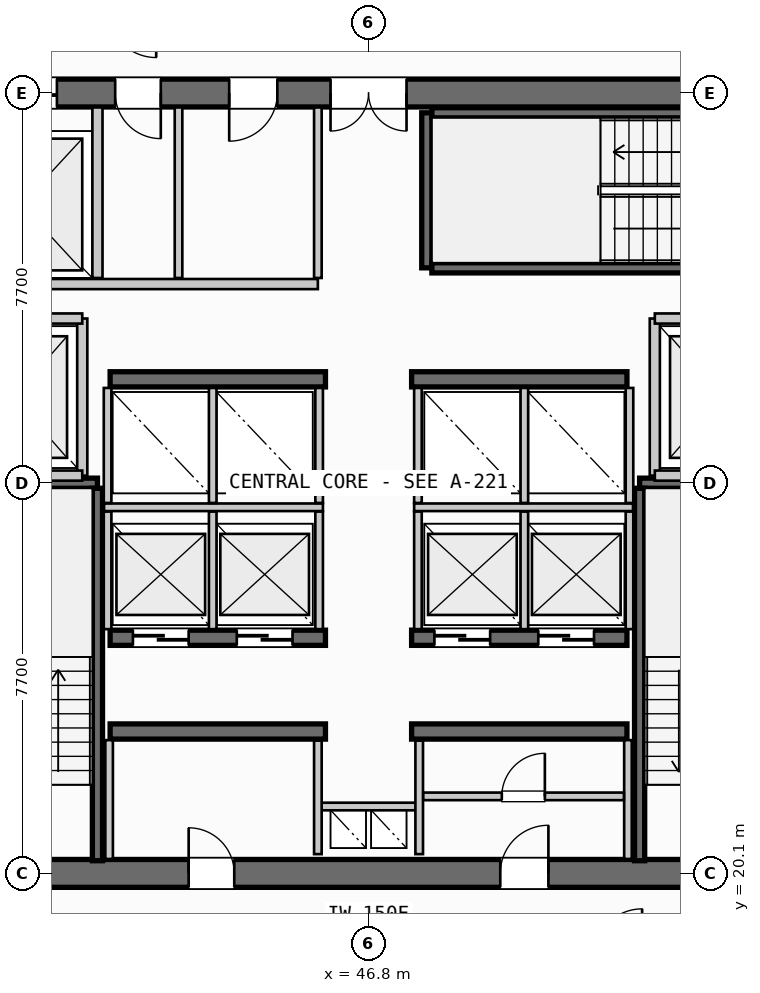
"""IFC4 building model, lengths in metres.
Left out: names, types, materials, properties, quantities, classifications, styles, units other than length and angle.
Written with IfcOpenShell. Run it as: python <this file> out.ifc"""

import sys

from ifc_helpers import new_model, si_unit, direction, frame, frame_2d, origin, place, context, subcontext, project, spatial, rectangle, extrude, source, transform, mapped, element, fill, save


model = new_model("IFC4")
c1 = context("Model", 3, precision=1e-05, world=origin(), true_north=direction((0.0, 1.0)))
c2 = subcontext(c1, "Body", "Model", "MODEL_VIEW")
j1 = project(units=[si_unit("LENGTHUNIT", "METRE"), si_unit("PLANEANGLEUNIT", "RADIAN")], contexts=[c1])
p1 = place(None, origin())
s1 = spatial("IfcSite", under=j1, at=p1, CompositionType="ELEMENT")
p2 = place(p1, origin())
s2 = spatial("IfcBuilding", under=s1, at=p2, CompositionType="ELEMENT")
p3 = place(p2, frame((0.0, 0.0, 150.1)))
s3 = spatial("IfcBuildingStorey", under=s2, at=p3, CompositionType="ELEMENT", Elevation=150.1)
p4 = place(p3, frame((38.0, 20.1, 0.0), z_axis=(0.0, 0.0, 1.0), x_axis=(1.0, 0.0, 0.0)))
e1 = element("IfcWall", 1, at=p4, inside=s3, PredefinedType="SHEAR", context=c2, shape_type="SweptSolid", body=[
    extrude(rectangle(XDim=17.6, YDim=0.55, at=frame_2d((8.8, 0.0))), origin(), (0.0, 0.0, 1.0), 3.3),
])
p5 = place(p4, frame((1.4, 0.0, 0.0)))
e2 = element("IfcOpeningElement", 2, at=p5, cuts=e1, PredefinedType="OPENING", context=c2, shape_type="SweptSolid", body=[
    extrude(rectangle(XDim=1.05, YDim=2.15, at=frame_2d((0.525, 1.075))), frame((0.0, 0.285, 0.0), z_axis=(0.0, -1.0, 0.0), x_axis=(1.0, 0.0, 0.0)), (0.0, 0.0, 1.0), 0.57),
])
p6 = place(p4, frame((15.15, 0.0, 0.0)))
e3 = element("IfcOpeningElement", 3, at=p6, cuts=e1, PredefinedType="OPENING", context=c2, shape_type="SweptSolid", body=[
    extrude(rectangle(XDim=1.05, YDim=2.15, at=frame_2d((0.525, 1.075))), frame((0.0, 0.285, 0.0), z_axis=(0.0, -1.0, 0.0), x_axis=(1.0, 0.0, 0.0)), (0.0, 0.0, 1.0), 0.57),
])
p7 = place(p4, frame((5.25, 0.0, 0.0)))
e4 = element("IfcOpeningElement", 4, at=p7, cuts=e1, PredefinedType="OPENING", context=c2, shape_type="SweptSolid", body=[
    extrude(rectangle(XDim=0.9, YDim=2.15, at=frame_2d((0.45, 1.075))), frame((0.0, 0.285, 0.0), z_axis=(0.0, -1.0, 0.0), x_axis=(1.0, 0.0, 0.0)), (0.0, 0.0, 1.0), 0.57),
])
p8 = place(p4, frame((11.4, 0.0, 0.0)))
e5 = element("IfcOpeningElement", 5, at=p8, cuts=e1, PredefinedType="OPENING", context=c2, shape_type="SweptSolid", body=[
    extrude(rectangle(XDim=0.95, YDim=2.15, at=frame_2d((0.475, 1.075))), frame((0.0, 0.285, 0.0), z_axis=(0.0, -1.0, 0.0), x_axis=(1.0, 0.0, 0.0)), (0.0, 0.0, 1.0), 0.57),
])
p9 = place(p3, frame((55.6, 35.5, 0.0), z_axis=(0.0, 0.0, 1.0), x_axis=(-1.0, 0.0, 0.0)))
e6 = element("IfcWall", 6, at=p9, inside=s3, PredefinedType="SHEAR", context=c2, shape_type="SweptSolid", body=[
    extrude(rectangle(XDim=17.6, YDim=0.55, at=frame_2d((8.8, 0.0))), origin(), (0.0, 0.0, 1.0), 3.3),
])
p10 = place(p9, frame((8.05, 0.0, 0.0)))
e7 = element("IfcOpeningElement", 7, at=p10, cuts=e6, PredefinedType="OPENING", context=c2, shape_type="SweptSolid", body=[
    extrude(rectangle(XDim=1.5, YDim=2.2, at=frame_2d((0.75, 1.1))), frame((0.0, 0.285, 0.0), z_axis=(0.0, -1.0, 0.0), x_axis=(1.0, 0.0, 0.0)), (0.0, 0.0, 1.0), 0.57),
])
p11 = place(p9, frame((14.95, 0.0, 0.0)))
e8 = element("IfcOpeningElement", 8, at=p11, cuts=e6, PredefinedType="OPENING", context=c2, shape_type="SweptSolid", body=[
    extrude(rectangle(XDim=1.4, YDim=2.3, at=frame_2d((0.7, 1.15))), frame((0.0, 0.285, 0.0), z_axis=(0.0, -1.0, 0.0), x_axis=(1.0, 0.0, 0.0)), (0.0, 0.0, 1.0), 0.57),
])
p12 = place(p9, frame((12.9, 0.0, 0.0)))
e9 = element("IfcOpeningElement", 9, at=p12, cuts=e6, PredefinedType="OPENING", context=c2, shape_type="SweptSolid", body=[
    extrude(rectangle(XDim=0.9, YDim=2.15, at=frame_2d((0.45, 1.075))), frame((0.0, 0.285, 0.0), z_axis=(0.0, -1.0, 0.0), x_axis=(1.0, 0.0, 0.0)), (0.0, 0.0, 1.0), 0.57),
])
p13 = place(p9, frame((10.6, 0.0, 0.0)))
e10 = element("IfcOpeningElement", 10, at=p13, cuts=e6, PredefinedType="OPENING", context=c2, shape_type="SweptSolid", body=[
    extrude(rectangle(XDim=0.95, YDim=2.15, at=frame_2d((0.475, 1.075))), frame((0.0, 0.285, 0.0), z_axis=(0.0, -1.0, 0.0), x_axis=(1.0, 0.0, 0.0)), (0.0, 0.0, 1.0), 0.57),
])
for number, where, z_axis, x_axis in (
    (11, (41.7, 22.9, 0.0), (0.0, 0.0, 1.0), (1.0, 0.0, 0.0)),
    (12, (47.65, 22.9, 0.0), (0.0, 0.0, 1.0), (1.0, 0.0, 0.0)),
):
    element("IfcWall", number, at=place(p3, frame(where, z_axis=z_axis, x_axis=x_axis)), inside=s3, PredefinedType="SHEAR", context=c2, shape_type="SweptSolid", body=[
        extrude(rectangle(XDim=4.25, YDim=0.3, at=frame_2d((2.125, 0.0))), origin(), (0.0, 0.0, 1.0), 3.3),
    ])
p14 = place(p3, frame((41.7, 24.75, 0.0), z_axis=(0.0, 0.0, 1.0), x_axis=(1.0, 0.0, 0.0)))
e13 = element("IfcWall", 13, at=p14, inside=s3, PredefinedType="SHEAR", context=c2, shape_type="SweptSolid", body=[
    extrude(rectangle(XDim=4.25, YDim=0.3, at=frame_2d((2.125, 0.0))), origin(), (0.0, 0.0, 1.0), 3.3),
])
p15 = place(p14, frame((0.45, 0.0, 0.0)))
e14 = element("IfcOpeningElement", 14, at=p15, cuts=e13, PredefinedType="OPENING", context=c2, shape_type="SweptSolid", body=[
    extrude(rectangle(XDim=1.1, YDim=2.2, at=frame_2d((0.55, 1.1))), frame((0.0, 0.16, 0.0), z_axis=(0.0, -1.0, 0.0), x_axis=(1.0, 0.0, 0.0)), (0.0, 0.0, 1.0), 0.32),
])
p16 = place(p14, frame((2.5, 0.0, 0.0)))
e15 = element("IfcOpeningElement", 15, at=p16, cuts=e13, PredefinedType="OPENING", context=c2, shape_type="SweptSolid", body=[
    extrude(rectangle(XDim=1.1, YDim=2.2, at=frame_2d((0.55, 1.1))), frame((0.0, 0.16, 0.0), z_axis=(0.0, -1.0, 0.0), x_axis=(1.0, 0.0, 0.0)), (0.0, 0.0, 1.0), 0.32),
])
p17 = place(p3, frame((47.65, 24.75, 0.0), z_axis=(0.0, 0.0, 1.0), x_axis=(1.0, 0.0, 0.0)))
e16 = element("IfcWall", 16, at=p17, inside=s3, PredefinedType="SHEAR", context=c2, shape_type="SweptSolid", body=[
    extrude(rectangle(XDim=4.25, YDim=0.3, at=frame_2d((2.125, 0.0))), origin(), (0.0, 0.0, 1.0), 3.3),
])
p18 = place(p17, frame((0.45, 0.0, 0.0)))
e17 = element("IfcOpeningElement", 17, at=p18, cuts=e16, PredefinedType="OPENING", context=c2, shape_type="SweptSolid", body=[
    extrude(rectangle(XDim=1.1, YDim=2.2, at=frame_2d((0.55, 1.1))), frame((0.0, 0.16, 0.0), z_axis=(0.0, -1.0, 0.0), x_axis=(1.0, 0.0, 0.0)), (0.0, 0.0, 1.0), 0.32),
])
p19 = place(p17, frame((2.5, 0.0, 0.0)))
e18 = element("IfcOpeningElement", 18, at=p19, cuts=e16, PredefinedType="OPENING", context=c2, shape_type="SweptSolid", body=[
    extrude(rectangle(XDim=1.1, YDim=2.2, at=frame_2d((0.55, 1.1))), frame((0.0, 0.16, 0.0), z_axis=(0.0, -1.0, 0.0), x_axis=(1.0, 0.0, 0.0)), (0.0, 0.0, 1.0), 0.32),
])
for number, where, z_axis, x_axis in (
    (19, (41.7, 29.85, 0.0), (0.0, 0.0, 1.0), (1.0, 0.0, 0.0)),
    (20, (47.65, 29.85, 0.0), (0.0, 0.0, 1.0), (1.0, 0.0, 0.0)),
):
    element("IfcWall", number, at=place(p3, frame(where, z_axis=z_axis, x_axis=x_axis)), inside=s3, PredefinedType="SHEAR", context=c2, shape_type="SweptSolid", body=[
        extrude(rectangle(XDim=4.25, YDim=0.3, at=frame_2d((2.125, 0.0))), origin(), (0.0, 0.0, 1.0), 3.3),
    ])
p20 = place(p3, frame((38.39, 27.8, 0.0), z_axis=(0.0, 0.0, 1.0), x_axis=(1.0, 0.0, 0.0)))
e21 = element("IfcWall", 21, at=p20, inside=s3, PredefinedType="SHEAR", context=c2, shape_type="SweptSolid", body=[
    extrude(rectangle(XDim=3.06, YDim=0.2, at=frame_2d((1.53, 0.0))), origin(), (0.0, 0.0, 1.0), 3.3),
])
p21 = place(p3, frame((41.45, 27.7, 0.0), z_axis=(0.0, 0.0, 1.0), x_axis=(0.0, -1.0, 0.0)))
e22 = element("IfcWall", 22, at=p21, inside=s3, PredefinedType="SHEAR", context=c2, shape_type="SweptSolid", body=[
    extrude(rectangle(XDim=7.35, YDim=0.2, at=frame_2d((3.675, 0.0))), origin(), (0.0, 0.0, 1.0), 3.3),
])
p22 = place(p3, frame((52.15, 27.8, 0.0), z_axis=(0.0, 0.0, 1.0), x_axis=(1.0, 0.0, 0.0)))
e23 = element("IfcWall", 23, at=p22, inside=s3, PredefinedType="SHEAR", context=c2, shape_type="SweptSolid", body=[
    extrude(rectangle(XDim=3.06, YDim=0.2, at=frame_2d((1.53, 0.0))), origin(), (0.0, 0.0, 1.0), 3.3),
])
p23 = place(p3, frame((52.15, 20.35, 0.0), z_axis=(0.0, 0.0, 1.0), x_axis=(0.0, 1.0, 0.0)))
e24 = element("IfcWall", 24, at=p23, inside=s3, PredefinedType="SHEAR", context=c2, shape_type="SweptSolid", body=[
    extrude(rectangle(XDim=7.35, YDim=0.2, at=frame_2d((3.675, 0.0))), origin(), (0.0, 0.0, 1.0), 3.3),
])
p24 = place(p3, frame((47.95, 32.05, 0.0), z_axis=(0.0, 0.0, 1.0), x_axis=(0.0, 1.0, 0.0)))
e25 = element("IfcWall", 25, at=p24, inside=s3, PredefinedType="SHEAR", context=c2, shape_type="SweptSolid", body=[
    extrude(rectangle(XDim=3.06, YDim=0.2, at=frame_2d((1.53, 0.0))), origin(), (0.0, 0.0, 1.0), 3.3),
])
for number, where, z_axis, x_axis in (
    (26, (48.05, 35.11, 0.0), (0.0, 0.0, 1.0), (1.0, 0.0, 0.0)),
    (27, (55.4, 32.05, 0.0), (0.0, 0.0, 1.0), (-1.0, 0.0, 0.0)),
):
    element("IfcWall", number, at=place(p3, frame(where, z_axis=z_axis, x_axis=x_axis)), inside=s3, PredefinedType="SHEAR", context=c2, shape_type="SweptSolid", body=[
        extrude(rectangle(XDim=7.35, YDim=0.2, at=frame_2d((3.675, 0.0))), origin(), (0.0, 0.0, 1.0), 3.3),
    ])
p25 = place(p3, frame((45.8, 21.42, 0.0), z_axis=(0.0, 0.0, 1.0), x_axis=(1.0, 0.0, 0.0)))
e28 = element("IfcWall", 28, at=p25, inside=s3, PredefinedType="PARTITIONING", context=c2, shape_type="SweptSolid", body=[
    extrude(rectangle(XDim=2.0, YDim=0.15, at=frame_2d((1.0, 0.0))), origin(), (0.0, 0.0, 1.0), 2.28),
])
for number, where, z_axis, x_axis in (
    (29, (45.8, 20.48, 0.0), (0.0, 0.0, 1.0), (0.0, 1.0, 0.0)),
    (30, (47.8, 20.48, 0.0), (0.0, 0.0, 1.0), (0.0, 1.0, 0.0)),
):
    element("IfcWall", number, at=place(p3, frame(where, z_axis=z_axis, x_axis=x_axis)), inside=s3, PredefinedType="PARTITIONING", context=c2, shape_type="SweptSolid", body=[
        extrude(rectangle(XDim=2.24, YDim=0.15, at=frame_2d((1.12, 0.0))), origin(), (0.0, 0.0, 1.0), 2.28),
    ])
p26 = place(p3, frame((41.15, 27.95, 0.0), z_axis=(0.0, 0.0, 1.0), x_axis=(0.0, 1.0, 0.0)))
e31 = element("IfcWall", 31, at=p26, inside=s3, PredefinedType="PARTITIONING", context=c2, shape_type="SweptSolid", body=[
    extrude(rectangle(XDim=3.1, YDim=0.2, at=frame_2d((1.55, 0.0))), origin(), (0.0, 0.0, 1.0), 2.28),
])
for number, where, z_axis, x_axis in (
    (32, (38.285, 27.95, 0.0), (0.0, 0.0, 1.0), (1.0, 0.0, 0.0)),
    (33, (38.285, 31.05, 0.0), (0.0, 0.0, 1.0), (1.0, 0.0, 0.0)),
):
    element("IfcWall", number, at=place(p3, frame(where, z_axis=z_axis, x_axis=x_axis)), inside=s3, PredefinedType="PARTITIONING", context=c2, shape_type="SweptSolid", body=[
        extrude(rectangle(XDim=2.865, YDim=0.2, at=frame_2d((1.433, 0.0))), origin(), (0.0, 0.0, 1.0), 2.28),
    ])
p27 = place(p3, frame((52.45, 27.95, 0.0), z_axis=(0.0, 0.0, 1.0), x_axis=(0.0, 1.0, 0.0)))
e34 = element("IfcWall", 34, at=p27, inside=s3, PredefinedType="PARTITIONING", context=c2, shape_type="SweptSolid", body=[
    extrude(rectangle(XDim=3.1, YDim=0.2, at=frame_2d((1.55, 0.0))), origin(), (0.0, 0.0, 1.0), 2.28),
])
for number, where, z_axis, x_axis in (
    (35, (52.45, 27.95, 0.0), (0.0, 0.0, 1.0), (1.0, 0.0, 0.0)),
    (36, (52.45, 31.05, 0.0), (0.0, 0.0, 1.0), (1.0, 0.0, 0.0)),
):
    element("IfcWall", number, at=place(p3, frame(where, z_axis=z_axis, x_axis=x_axis)), inside=s3, PredefinedType="PARTITIONING", context=c2, shape_type="SweptSolid", body=[
        extrude(rectangle(XDim=2.865, YDim=0.2, at=frame_2d((1.433, 0.0))), origin(), (0.0, 0.0, 1.0), 2.28),
    ])
for number, where, z_axis, x_axis in (
    (37, (41.68, 20.385, 0.0), (0.0, 0.0, 1.0), (0.0, 1.0, 0.0)),
    (38, (51.92, 20.385, 0.0), (0.0, 0.0, 1.0), (0.0, 1.0, 0.0)),
):
    element("IfcWall", number, at=place(p3, frame(where, z_axis=z_axis, x_axis=x_axis)), inside=s3, PredefinedType="PARTITIONING", context=c2, shape_type="SweptSolid", body=[
        extrude(rectangle(XDim=2.345, YDim=0.15, at=frame_2d((1.172, 0.0))), origin(), (0.0, 0.0, 1.0), 2.28),
    ])
p28 = place(p3, frame((47.88, 21.62, 0.0), z_axis=(0.0, 0.0, 1.0), x_axis=(1.0, 0.0, 0.0)))
e39 = element("IfcWall", 39, at=p28, inside=s3, PredefinedType="PARTITIONING", context=c2, shape_type="SweptSolid", body=[
    extrude(rectangle(XDim=3.96, YDim=0.15, at=frame_2d((1.98, 0.0))), origin(), (0.0, 0.0, 1.0), 2.28),
])
p29 = place(p28, frame((1.55, 0.0, 0.0)))
e40 = element("IfcOpeningElement", 40, at=p29, cuts=e39, PredefinedType="OPENING", context=c2, shape_type="SweptSolid", body=[
    extrude(rectangle(XDim=0.85, YDim=2.15, at=frame_2d((0.425, 1.075))), frame((0.0, 0.085, 0.0), z_axis=(0.0, -1.0, 0.0), x_axis=(1.0, 0.0, 0.0)), (0.0, 0.0, 1.0), 0.17),
])
p30 = place(p3, frame((41.58, 27.325, 0.0), z_axis=(0.0, 0.0, 1.0), x_axis=(1.0, 0.0, 0.0)))
e41 = element("IfcWall", 41, at=p30, inside=s3, PredefinedType="PARTITIONING", context=c2, shape_type="SweptSolid", body=[
    extrude(rectangle(XDim=4.32, YDim=0.15, at=frame_2d((2.16, 0.0))), origin(), (0.0, 0.0, 1.0), 2.28),
])
p31 = place(p3, frame((47.7, 27.325, 0.0), z_axis=(0.0, 0.0, 1.0), x_axis=(1.0, 0.0, 0.0)))
e42 = element("IfcWall", 42, at=p31, inside=s3, PredefinedType="PARTITIONING", context=c2, shape_type="SweptSolid", body=[
    extrude(rectangle(XDim=4.32, YDim=0.15, at=frame_2d((2.16, 0.0))), origin(), (0.0, 0.0, 1.0), 2.28),
])
for number, where, z_axis, x_axis in (
    (43, (41.65, 24.92, 0.0), (0.0, 0.0, 1.0), (0.0, 1.0, 0.0)),
    (44, (43.725, 24.92, 0.0), (0.0, 0.0, 1.0), (0.0, 1.0, 0.0)),
    (45, (45.825, 24.92, 0.0), (0.0, 0.0, 1.0), (0.0, 1.0, 0.0)),
    (46, (47.775, 24.92, 0.0), (0.0, 0.0, 1.0), (0.0, 1.0, 0.0)),
    (47, (49.875, 24.92, 0.0), (0.0, 0.0, 1.0), (0.0, 1.0, 0.0)),
    (48, (51.95, 24.92, 0.0), (0.0, 0.0, 1.0), (0.0, 1.0, 0.0)),
):
    element("IfcWall", number, at=place(p3, frame(where, z_axis=z_axis, x_axis=x_axis)), inside=s3, PredefinedType="PARTITIONING", context=c2, shape_type="SweptSolid", body=[
        extrude(rectangle(XDim=2.32, YDim=0.15, at=frame_2d((1.16, 0.0))), origin(), (0.0, 0.0, 1.0), 2.28),
    ])
for number, where, z_axis, x_axis in (
    (49, (41.65, 27.41, 0.0), (0.0, 0.0, 1.0), (0.0, 1.0, 0.0)),
    (50, (43.725, 27.41, 0.0), (0.0, 0.0, 1.0), (0.0, 1.0, 0.0)),
    (51, (45.825, 27.41, 0.0), (0.0, 0.0, 1.0), (0.0, 1.0, 0.0)),
    (52, (47.775, 27.41, 0.0), (0.0, 0.0, 1.0), (0.0, 1.0, 0.0)),
    (53, (49.875, 27.41, 0.0), (0.0, 0.0, 1.0), (0.0, 1.0, 0.0)),
    (54, (51.95, 27.41, 0.0), (0.0, 0.0, 1.0), (0.0, 1.0, 0.0)),
):
    element("IfcWall", number, at=place(p3, frame(where, z_axis=z_axis, x_axis=x_axis)), inside=s3, PredefinedType="PARTITIONING", context=c2, shape_type="SweptSolid", body=[
        extrude(rectangle(XDim=2.27, YDim=0.15, at=frame_2d((1.135, 0.0))), origin(), (0.0, 0.0, 1.0), 2.28),
    ])
p32 = place(p3, frame((41.45, 31.85, 0.0), z_axis=(0.0, 0.0, 1.0), x_axis=(0.0, 1.0, 0.0)))
e55 = element("IfcWall", 55, at=p32, inside=s3, PredefinedType="PARTITIONING", context=c2, shape_type="SweptSolid", body=[
    extrude(rectangle(XDim=3.365, YDim=0.2, at=frame_2d((1.683, 0.0))), origin(), (0.0, 0.0, 1.0), 2.28),
])
p33 = place(p3, frame((38.285, 31.73, 0.0), z_axis=(0.0, 0.0, 1.0), x_axis=(1.0, 0.0, 0.0)))
e56 = element("IfcWall", 56, at=p33, inside=s3, PredefinedType="PARTITIONING", context=c2, shape_type="SweptSolid", body=[
    extrude(rectangle(XDim=7.515, YDim=0.2, at=frame_2d((3.758, 0.0))), origin(), (0.0, 0.0, 1.0), 2.28),
])
p34 = place(p3, frame((45.8, 31.85, 0.0), z_axis=(0.0, 0.0, 1.0), x_axis=(0.0, 1.0, 0.0)))
e57 = element("IfcWall", 57, at=p34, inside=s3, PredefinedType="PARTITIONING", context=c2, shape_type="SweptSolid", body=[
    extrude(rectangle(XDim=3.365, YDim=0.15, at=frame_2d((1.683, 0.0))), origin(), (0.0, 0.0, 1.0), 2.28),
])
p35 = place(p3, frame((43.05, 31.85, 0.0), z_axis=(0.0, 0.0, 1.0), x_axis=(0.0, 1.0, 0.0)))
e58 = element("IfcWall", 58, at=p35, inside=s3, PredefinedType="PLUMBINGWALL", context=c2, shape_type="SweptSolid", body=[
    extrude(rectangle(XDim=3.365, YDim=0.15, at=frame_2d((1.683, 0.0))), origin(), (0.0, 0.0, 1.0), 2.28),
])
m1 = source(origin(), c2, "Body", "SweptSolid", [
    extrude(rectangle(XDim=1.5, YDim=2.2, at=frame_2d((0.75, 1.1))), frame((0.0, 0.025, 0.0), z_axis=(0.0, -1.0, 0.0), x_axis=(1.0, 0.0, 0.0)), (0.0, 0.0, 1.0), 0.05),
])
p36 = place(p10, origin())
e59 = element("IfcDoor", 59, at=p36, inside=s3, OperationType="DOUBLE_DOOR_SINGLE_SWING", PredefinedType="DOOR", context=c2, shape_type="MappedRepresentation", body=[
    mapped(m1, transform((0.0, 0.0, 0.0), scale=1.0)),
])
fill(e7, e59)
m2 = source(origin(), c2, "Body", "SweptSolid", [
    extrude(rectangle(XDim=0.9, YDim=2.15, at=frame_2d((0.45, 1.075))), frame((0.0, 0.025, 0.0), z_axis=(0.0, -1.0, 0.0), x_axis=(1.0, 0.0, 0.0)), (0.0, 0.0, 1.0), 0.05),
])
p37 = place(p7, origin())
e60 = element("IfcDoor", 60, at=p37, inside=s3, OperationType="SINGLE_SWING_LEFT", PredefinedType="DOOR", context=c2, shape_type="MappedRepresentation", body=[
    mapped(m2, transform((0.0, 0.0, 0.0), scale=1.0)),
])
fill(e4, e60)
m3 = source(origin(), c2, "Body", "SweptSolid", [
    extrude(rectangle(XDim=0.95, YDim=2.15, at=frame_2d((0.475, 1.075))), frame((0.0, 0.025, 0.0), z_axis=(0.0, -1.0, 0.0), x_axis=(1.0, 0.0, 0.0)), (0.0, 0.0, 1.0), 0.05),
])
p38 = place(p8, origin())
e61 = element("IfcDoor", 61, at=p38, inside=s3, OperationType="SINGLE_SWING_RIGHT", PredefinedType="DOOR", context=c2, shape_type="MappedRepresentation", body=[
    mapped(m3, transform((0.0, 0.0, 0.0), scale=1.0)),
])
fill(e5, e61)
m4 = source(origin(), c2, "Body", "SweptSolid", [
    extrude(rectangle(XDim=1.1, YDim=2.2, at=frame_2d((0.55, 1.1))), frame((0.0, 0.025, 0.0), z_axis=(0.0, -1.0, 0.0), x_axis=(1.0, 0.0, 0.0)), (0.0, 0.0, 1.0), 0.05),
])
p39 = place(p15, origin())
e62 = element("IfcDoor", 62, at=p39, inside=s3, OperationType="SLIDING_TO_RIGHT", PredefinedType="DOOR", context=c2, shape_type="MappedRepresentation", body=[
    mapped(m4, transform((0.0, 0.0, 0.0), scale=1.0)),
])
fill(e14, e62)
p40 = place(p16, origin())
e63 = element("IfcDoor", 63, at=p40, inside=s3, OperationType="SLIDING_TO_RIGHT", PredefinedType="DOOR", context=c2, shape_type="MappedRepresentation", body=[
    mapped(m4, transform((0.0, 0.0, 0.0), scale=1.0)),
])
fill(e15, e63)
p41 = place(p18, origin())
e64 = element("IfcDoor", 64, at=p41, inside=s3, OperationType="SLIDING_TO_RIGHT", PredefinedType="DOOR", context=c2, shape_type="MappedRepresentation", body=[
    mapped(m4, transform((0.0, 0.0, 0.0), scale=1.0)),
])
fill(e17, e64)
p42 = place(p19, origin())
e65 = element("IfcDoor", 65, at=p42, inside=s3, OperationType="SLIDING_TO_RIGHT", PredefinedType="DOOR", context=c2, shape_type="MappedRepresentation", body=[
    mapped(m4, transform((0.0, 0.0, 0.0), scale=1.0)),
])
fill(e18, e65)
m5 = source(origin(), c2, "Body", "SweptSolid", [
    extrude(rectangle(XDim=1.4, YDim=2.3, at=frame_2d((0.7, 1.15))), frame((0.0, 0.025, 0.0), z_axis=(0.0, -1.0, 0.0), x_axis=(1.0, 0.0, 0.0)), (0.0, 0.0, 1.0), 0.05),
])
p43 = place(p11, origin())
e66 = element("IfcDoor", 66, at=p43, inside=s3, OperationType="SLIDING_TO_RIGHT", PredefinedType="DOOR", context=c2, shape_type="MappedRepresentation", body=[
    mapped(m5, transform((0.0, 0.0, 0.0), scale=1.0)),
])
fill(e8, e66)
p44 = place(p12, origin())
e67 = element("IfcDoor", 67, at=p44, inside=s3, OperationType="SINGLE_SWING_LEFT", PredefinedType="DOOR", context=c2, shape_type="MappedRepresentation", body=[
    mapped(m2, transform((0.0, 0.0, 0.0), scale=1.0)),
])
fill(e9, e67)
p45 = place(p13, origin())
e68 = element("IfcDoor", 68, at=p45, inside=s3, OperationType="SINGLE_SWING_RIGHT", PredefinedType="DOOR", context=c2, shape_type="MappedRepresentation", body=[
    mapped(m3, transform((0.0, 0.0, 0.0), scale=1.0)),
])
fill(e10, e68)
m6 = source(origin(), c2, "Body", "SweptSolid", [
    extrude(rectangle(XDim=0.85, YDim=2.15, at=frame_2d((0.425, 1.075))), frame((0.0, 0.025, 0.0), z_axis=(0.0, -1.0, 0.0), x_axis=(1.0, 0.0, 0.0)), (0.0, 0.0, 1.0), 0.05),
])
p46 = place(p29, origin())
e69 = element("IfcDoor", 69, at=p46, inside=s3, OperationType="SINGLE_SWING_RIGHT", PredefinedType="DOOR", context=c2, shape_type="MappedRepresentation", body=[
    mapped(m6, transform((0.0, 0.0, 0.0), scale=1.0)),
])
fill(e40, e69)
save(model, sys.argv[1])
